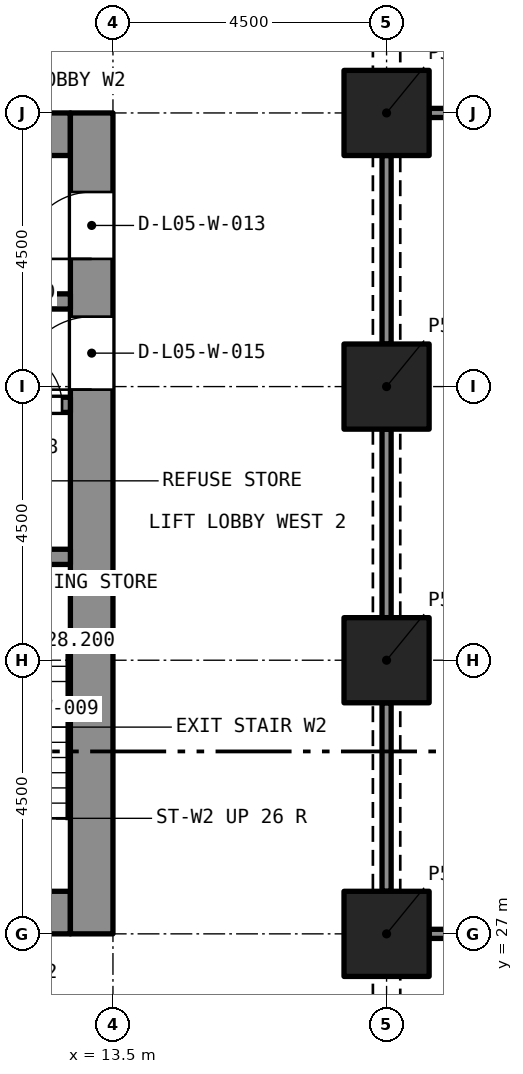
"""IFC4 building model, lengths in metres.
Left out: names, types, materials, properties, quantities, classifications, styles, units other than length and angle.
Written with IfcOpenShell. Run it as: python <this file> out.ifc"""

import sys

from ifc_helpers import new_model, si_unit, direction, frame, frame_2d, origin, origin_2d, place, context, subcontext, project, spatial, rectangle, extrude, element, fill, save


model = new_model("IFC4")
c1 = context("Model", 3, precision=1e-05, world=origin(), true_north=direction((0.0, 1.0)))
c2 = subcontext(c1, "Body", "Model", "MODEL_VIEW")
j1 = project(units=[si_unit("LENGTHUNIT", "METRE"), si_unit("PLANEANGLEUNIT", "RADIAN")], contexts=[c1])
p1 = place(None, origin())
s1 = spatial("IfcSite", under=j1, at=p1, CompositionType="ELEMENT")
p2 = place(p1, origin())
s2 = spatial("IfcBuilding", under=s1, at=p2, CompositionType="ELEMENT")
p3 = place(p2, frame((0.0, 0.0, 26.0)))
s3 = spatial("IfcBuildingStorey", under=s2, at=p3, CompositionType="ELEMENT", Elevation=26.0)
for number, where, z_axis, x_axis in (
    (1, (18.0, 27.0, 0.0), (0.0, 0.0, 1.0), (1.0, 0.0, 0.0)),
    (2, (18.0, 31.5, 0.0), (0.0, 0.0, 1.0), (1.0, 0.0, 0.0)),
    (3, (18.0, 36.0, 0.0), (0.0, 0.0, 1.0), (1.0, 0.0, 0.0)),
    (4, (18.0, 40.5, 0.0), (0.0, 0.0, 1.0), (1.0, 0.0, 0.0)),
):
    element("IfcColumn", number, at=place(p3, frame(where, z_axis=z_axis, x_axis=x_axis)), inside=s3, PredefinedType="COLUMN", context=c2, shape_type="SweptSolid", body=[
        extrude(rectangle(XDim=1.4, YDim=1.4, at=origin_2d()), origin(), (0.0, 0.0, 1.0), 4.4),
    ])
p4 = place(p3, frame((5.2, 27.35, 0.0), z_axis=(0.0, 0.0, 1.0), x_axis=(1.0, 0.0, 0.0)))
e5 = element("IfcWall", 5, at=p4, inside=s3, PredefinedType="SOLIDWALL", context=c2, shape_type="SweptSolid", body=[
    extrude(rectangle(XDim=7.6, YDim=0.7, at=frame_2d((3.8, 0.0))), origin(), (0.0, 0.0, 1.0), 4.4),
])
p5 = place(p4, frame((0.725, 0.0, 0.0)))
e6 = element("IfcOpeningElement", 6, at=p5, cuts=e5, PredefinedType="OPENING", context=c2, shape_type="SweptSolid", body=[
    extrude(rectangle(XDim=1.1, YDim=2.1, at=frame_2d((0.55, 1.05))), frame((0.0, 0.36, 0.0), z_axis=(0.0, -1.0, 0.0), x_axis=(1.0, 0.0, 0.0)), (0.0, 0.0, 1.0), 0.72),
])
p6 = place(p4, frame((3.25, 0.0, 0.0)))
e7 = element("IfcOpeningElement", 7, at=p6, cuts=e5, PredefinedType="OPENING", context=c2, shape_type="SweptSolid", body=[
    extrude(rectangle(XDim=1.1, YDim=2.1, at=frame_2d((0.55, 1.05))), frame((0.0, 0.36, 0.0), z_axis=(0.0, -1.0, 0.0), x_axis=(1.0, 0.0, 0.0)), (0.0, 0.0, 1.0), 0.72),
])
p7 = place(p4, frame((5.775, 0.0, 0.0)))
e8 = element("IfcOpeningElement", 8, at=p7, cuts=e5, PredefinedType="OPENING", context=c2, shape_type="SweptSolid", body=[
    extrude(rectangle(XDim=1.1, YDim=2.1, at=frame_2d((0.55, 1.05))), frame((0.0, 0.36, 0.0), z_axis=(0.0, -1.0, 0.0), x_axis=(1.0, 0.0, 0.0)), (0.0, 0.0, 1.0), 0.72),
])
p8 = place(p3, frame((5.2, 40.15, 0.0), z_axis=(0.0, 0.0, 1.0), x_axis=(1.0, 0.0, 0.0)))
e9 = element("IfcWall", 9, at=p8, inside=s3, PredefinedType="SOLIDWALL", context=c2, shape_type="SweptSolid", body=[
    extrude(rectangle(XDim=7.6, YDim=0.7, at=frame_2d((3.8, 0.0))), origin(), (0.0, 0.0, 1.0), 4.4),
])
p9 = place(p3, frame((13.15, 27.0, 0.0), z_axis=(0.0, 0.0, 1.0), x_axis=(0.0, 1.0, 0.0)))
e10 = element("IfcWall", 10, at=p9, inside=s3, PredefinedType="SOLIDWALL", context=c2, shape_type="SweptSolid", body=[
    extrude(rectangle(XDim=13.5, YDim=0.7, at=frame_2d((6.75, 0.0))), origin(), (0.0, 0.0, 1.0), 4.4),
])
p10 = place(p9, frame((11.1, 0.0, 0.0)))
e11 = element("IfcOpeningElement", 11, at=p10, cuts=e10, PredefinedType="OPENING", context=c2, shape_type="SweptSolid", body=[
    extrude(rectangle(XDim=1.1, YDim=2.1, at=frame_2d((0.55, 1.05))), frame((0.0, 0.36, 0.0), z_axis=(0.0, -1.0, 0.0), x_axis=(1.0, 0.0, 0.0)), (0.0, 0.0, 1.0), 0.72),
])
p11 = place(p9, frame((8.95, 0.0, 0.0)))
e12 = element("IfcOpeningElement", 12, at=p11, cuts=e10, PredefinedType="OPENING", context=c2, shape_type="SweptSolid", body=[
    extrude(rectangle(XDim=1.2, YDim=2.1, at=frame_2d((0.6, 1.05))), frame((0.0, 0.36, 0.0), z_axis=(0.0, -1.0, 0.0), x_axis=(1.0, 0.0, 0.0)), (0.0, 0.0, 1.0), 0.72),
])
p12 = place(p3, frame((5.2, 33.2, 0.0), z_axis=(0.0, 0.0, 1.0), x_axis=(1.0, 0.0, 0.0)))
e13 = element("IfcWall", 13, at=p12, inside=s3, PredefinedType="SOLIDWALL", context=c2, shape_type="SweptSolid", body=[
    extrude(rectangle(XDim=7.6, YDim=0.25, at=frame_2d((3.8, 0.0))), origin(), (0.0, 0.0, 1.0), 4.1),
])
p13 = place(p12, frame((3.3, 0.0, 0.0)))
e14 = element("IfcOpeningElement", 14, at=p13, cuts=e13, PredefinedType="OPENING", context=c2, shape_type="SweptSolid", body=[
    extrude(rectangle(XDim=1.0, YDim=2.1, at=frame_2d((0.5, 1.05))), frame((0.0, 0.135, 0.0), z_axis=(0.0, -1.0, 0.0), x_axis=(1.0, 0.0, 0.0)), (0.0, 0.0, 1.0), 0.27),
])
p14 = place(p3, frame((5.2, 35.7, 0.0), z_axis=(0.0, 0.0, 1.0), x_axis=(1.0, 0.0, 0.0)))
e15 = element("IfcWall", 15, at=p14, inside=s3, PredefinedType="SOLIDWALL", context=c2, shape_type="SweptSolid", body=[
    extrude(rectangle(XDim=7.6, YDim=0.25, at=frame_2d((3.8, 0.0))), origin(), (0.0, 0.0, 1.0), 4.1),
])
p15 = place(p14, frame((0.137, 0.0, 0.0)))
e16 = element("IfcOpeningElement", 16, at=p15, cuts=e15, PredefinedType="OPENING", context=c2, shape_type="SweptSolid", body=[
    extrude(rectangle(XDim=0.9, YDim=2.1, at=frame_2d((0.45, 1.05))), frame((0.0, 0.135, 0.0), z_axis=(0.0, -1.0, 0.0), x_axis=(1.0, 0.0, 0.0)), (0.0, 0.0, 1.0), 0.27),
])
p16 = place(p14, frame((1.512, 0.0, 0.0)))
e17 = element("IfcOpeningElement", 17, at=p16, cuts=e15, PredefinedType="OPENING", context=c2, shape_type="SweptSolid", body=[
    extrude(rectangle(XDim=0.9, YDim=2.1, at=frame_2d((0.45, 1.05))), frame((0.0, 0.135, 0.0), z_axis=(0.0, -1.0, 0.0), x_axis=(1.0, 0.0, 0.0)), (0.0, 0.0, 1.0), 0.27),
])
p17 = place(p14, frame((5.188, 0.0, 0.0)))
e18 = element("IfcOpeningElement", 18, at=p17, cuts=e15, PredefinedType="OPENING", context=c2, shape_type="SweptSolid", body=[
    extrude(rectangle(XDim=0.9, YDim=2.1, at=frame_2d((0.45, 1.05))), frame((0.0, 0.135, 0.0), z_axis=(0.0, -1.0, 0.0), x_axis=(1.0, 0.0, 0.0)), (0.0, 0.0, 1.0), 0.27),
])
p18 = place(p14, frame((6.562, 0.0, 0.0)))
e19 = element("IfcOpeningElement", 19, at=p18, cuts=e15, PredefinedType="OPENING", context=c2, shape_type="SweptSolid", body=[
    extrude(rectangle(XDim=0.9, YDim=2.1, at=frame_2d((0.45, 1.05))), frame((0.0, 0.135, 0.0), z_axis=(0.0, -1.0, 0.0), x_axis=(1.0, 0.0, 0.0)), (0.0, 0.0, 1.0), 0.27),
])
p19 = place(p3, frame((5.2, 37.4, 0.0), z_axis=(0.0, 0.0, 1.0), x_axis=(1.0, 0.0, 0.0)))
e20 = element("IfcWall", 20, at=p19, inside=s3, PredefinedType="SOLIDWALL", context=c2, shape_type="SweptSolid", body=[
    extrude(rectangle(XDim=7.6, YDim=0.25, at=frame_2d((3.8, 0.0))), origin(), (0.0, 0.0, 1.0), 4.1),
])
p20 = place(p19, frame((0.7, 0.0, 0.0)))
e21 = element("IfcOpeningElement", 21, at=p20, cuts=e20, PredefinedType="OPENING", context=c2, shape_type="SweptSolid", body=[
    extrude(rectangle(XDim=1.1, YDim=2.4, at=frame_2d((0.55, 1.2))), frame((0.0, 0.135, 0.0), z_axis=(0.0, -1.0, 0.0), x_axis=(1.0, 0.0, 0.0)), (0.0, 0.0, 1.0), 0.27),
])
p21 = place(p3, frame((18.7, 27.0, 0.0), z_axis=(0.0, 0.0, 1.0), x_axis=(1.0, 0.0, 0.0)))
e22 = element("IfcWall", 22, at=p21, inside=s3, PredefinedType="PARTITIONING", context=c2, shape_type="SweptSolid", body=[
    extrude(rectangle(XDim=12.1, YDim=0.15, at=frame_2d((6.05, 0.0))), origin(), (0.0, 0.0, 1.0), 3.95),
])
p22 = place(p21, frame((5.45, 0.0, 0.0)))
e23 = element("IfcOpeningElement", 23, at=p22, cuts=e22, PredefinedType="OPENING", context=c2, shape_type="SweptSolid", body=[
    extrude(rectangle(XDim=1.2, YDim=2.1, at=frame_2d((0.6, 1.05))), frame((0.0, 0.085, 0.0), z_axis=(0.0, -1.0, 0.0), x_axis=(1.0, 0.0, 0.0)), (0.0, 0.0, 1.0), 0.17),
])
p23 = place(p3, frame((18.7, 40.5, 0.0), z_axis=(0.0, 0.0, 1.0), x_axis=(1.0, 0.0, 0.0)))
e24 = element("IfcWall", 24, at=p23, inside=s3, PredefinedType="PARTITIONING", context=c2, shape_type="SweptSolid", body=[
    extrude(rectangle(XDim=12.1, YDim=0.15, at=frame_2d((6.05, 0.0))), origin(), (0.0, 0.0, 1.0), 3.95),
])
for number, where, z_axis, x_axis in (
    (25, (18.0, 27.7, 0.0), (0.0, 0.0, 1.0), (0.0, 1.0, 0.0)),
    (26, (18.0, 32.2, 0.0), (0.0, 0.0, 1.0), (0.0, 1.0, 0.0)),
    (27, (18.0, 36.7, 0.0), (0.0, 0.0, 1.0), (0.0, 1.0, 0.0)),
):
    element("IfcWall", number, at=place(p3, frame(where, z_axis=z_axis, x_axis=x_axis)), inside=s3, PredefinedType="PARTITIONING", context=c2, shape_type="SweptSolid", body=[
        extrude(rectangle(XDim=3.1, YDim=0.15, at=frame_2d((1.55, 0.0))), origin(), (0.0, 0.0, 1.0), 3.58),
    ])
p24 = place(p18, origin())
e28 = element("IfcDoor", 28, at=p24, inside=s3, OperationType="SINGLE_SWING_LEFT", PredefinedType="DOOR", context=c2, shape_type="SweptSolid", body=[
    extrude(rectangle(XDim=0.9, YDim=2.1, at=frame_2d((0.45, 1.05))), frame((0.0, 0.025, 0.0), z_axis=(0.0, -1.0, 0.0), x_axis=(1.0, 0.0, 0.0)), (0.0, 0.0, 1.0), 0.05),
])
fill(e19, e28)
p25 = place(p10, origin())
e29 = element("IfcDoor", 29, at=p25, inside=s3, OperationType="SINGLE_SWING_LEFT", PredefinedType="DOOR", context=c2, shape_type="SweptSolid", body=[
    extrude(rectangle(XDim=1.1, YDim=2.1, at=frame_2d((0.55, 1.05))), frame((0.0, 0.025, 0.0), z_axis=(0.0, -1.0, 0.0), x_axis=(1.0, 0.0, 0.0)), (0.0, 0.0, 1.0), 0.05),
])
fill(e11, e29)
p26 = place(p11, origin())
e30 = element("IfcDoor", 30, at=p26, inside=s3, OperationType="SINGLE_SWING_LEFT", PredefinedType="DOOR", context=c2, shape_type="SweptSolid", body=[
    extrude(rectangle(XDim=1.2, YDim=2.1, at=frame_2d((0.6, 1.05))), frame((0.0, 0.025, 0.0), z_axis=(0.0, -1.0, 0.0), x_axis=(1.0, 0.0, 0.0)), (0.0, 0.0, 1.0), 0.05),
])
fill(e12, e30)
save(model, sys.argv[1])
